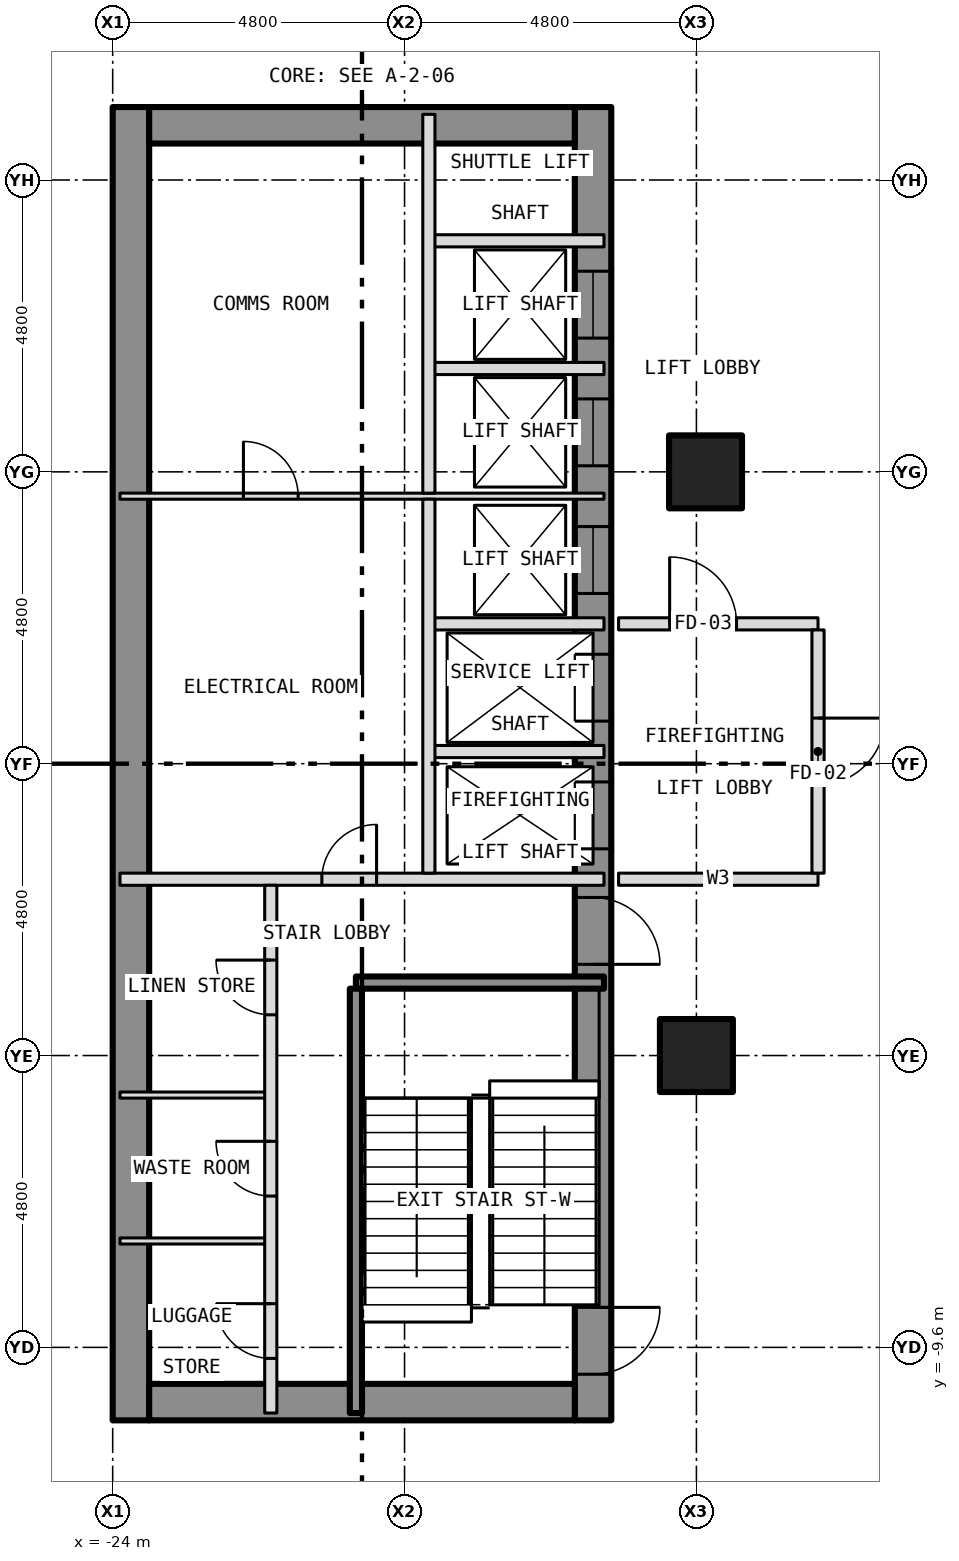
"""IFC4 building model, lengths in metres.
Left out: names, types, materials, properties, quantities, classifications, styles, units other than length and angle.
Written with IfcOpenShell. Run it as: python <this file> out.ifc"""

import sys

from ifc_helpers import new_model, si_unit, direction, frame, frame_2d, origin, origin_2d, place, context, subcontext, project, spatial, rectangle, hollow_rectangle, extrude, element, fill, save


model = new_model("IFC4")
c1 = context("Model", 3, precision=1e-05, world=origin(), true_north=direction((0.0, 1.0)))
c2 = subcontext(c1, "Body", "Model", "MODEL_VIEW")
j1 = project(units=[si_unit("LENGTHUNIT", "METRE"), si_unit("PLANEANGLEUNIT", "RADIAN")], contexts=[c1])
p1 = place(None, origin())
s1 = spatial("IfcSite", under=j1, at=p1, CompositionType="ELEMENT")
p2 = place(p1, origin())
s2 = spatial("IfcBuilding", under=s1, at=p2, CompositionType="ELEMENT")
p3 = place(p2, frame((0.0, 0.0, 20.0)))
s3 = spatial("IfcBuildingStorey", under=s2, at=p3, CompositionType="ELEMENT", Elevation=20.0)
for number, where, z_axis, x_axis in (
    (1, (-14.4, -4.8, -0.2), (0.0, 0.0, 1.0), (1.0, 0.0, 0.0)),
    (2, (-14.25, 4.8, -0.2), (0.0, 0.0, 1.0), (1.0, 0.0, 0.0)),
):
    element("IfcColumn", number, at=place(p3, frame(where, z_axis=z_axis, x_axis=x_axis)), inside=s3, PredefinedType="COLUMN", context=c2, shape_type="SweptSolid", body=[
        extrude(hollow_rectangle(XDim=1.2, YDim=1.2, WallThickness=0.07, at=origin_2d()), origin(), (0.0, 0.0, 1.0), 4.5),
    ])
p4 = place(p3, frame((-16.1, -10.8, 0.0), z_axis=(0.0, 0.0, 1.0), x_axis=(0.0, 1.0, 0.0)))
e3 = element("IfcWall", 3, at=p4, inside=s3, PredefinedType="SHEAR", context=c2, shape_type="SweptSolid", body=[
    extrude(rectangle(XDim=21.6, YDim=0.6, at=frame_2d((10.8, 0.0))), origin(), (0.0, 0.0, 1.0), 4.2),
])
p5 = place(p4, frame((9.4, 0.0, 0.0)))
e4 = element("IfcOpeningElement", 4, at=p5, cuts=e3, PredefinedType="OPENING", context=c2, shape_type="SweptSolid", body=[
    extrude(rectangle(XDim=1.1, YDim=2.1, at=frame_2d((0.55, 1.05))), frame((0.0, 0.312, 0.0), z_axis=(0.0, -1.0, 0.0), x_axis=(1.0, 0.0, 0.0)), (0.0, 0.0, 1.0), 0.624),
])
p6 = place(p4, frame((11.5, 0.0, 0.0)))
e5 = element("IfcOpeningElement", 5, at=p6, cuts=e3, PredefinedType="OPENING", context=c2, shape_type="SweptSolid", body=[
    extrude(rectangle(XDim=1.1, YDim=2.1, at=frame_2d((0.55, 1.05))), frame((0.0, 0.312, 0.0), z_axis=(0.0, -1.0, 0.0), x_axis=(1.0, 0.0, 0.0)), (0.0, 0.0, 1.0), 0.624),
])
p7 = place(p4, frame((13.6, 0.0, 0.0)))
e6 = element("IfcOpeningElement", 6, at=p7, cuts=e3, PredefinedType="OPENING", context=c2, shape_type="SweptSolid", body=[
    extrude(rectangle(XDim=1.1, YDim=2.1, at=frame_2d((0.55, 1.05))), frame((0.0, 0.312, 0.0), z_axis=(0.0, -1.0, 0.0), x_axis=(1.0, 0.0, 0.0)), (0.0, 0.0, 1.0), 0.624),
])
p8 = place(p4, frame((15.7, 0.0, 0.0)))
e7 = element("IfcOpeningElement", 7, at=p8, cuts=e3, PredefinedType="OPENING", context=c2, shape_type="SweptSolid", body=[
    extrude(rectangle(XDim=1.1, YDim=2.1, at=frame_2d((0.55, 1.05))), frame((0.0, 0.312, 0.0), z_axis=(0.0, -1.0, 0.0), x_axis=(1.0, 0.0, 0.0)), (0.0, 0.0, 1.0), 0.624),
])
p9 = place(p4, frame((17.8, 0.0, 0.0)))
e8 = element("IfcOpeningElement", 8, at=p9, cuts=e3, PredefinedType="OPENING", context=c2, shape_type="SweptSolid", body=[
    extrude(rectangle(XDim=1.1, YDim=2.1, at=frame_2d((0.55, 1.05))), frame((0.0, 0.312, 0.0), z_axis=(0.0, -1.0, 0.0), x_axis=(1.0, 0.0, 0.0)), (0.0, 0.0, 1.0), 0.624),
])
p10 = place(p4, frame((0.758, 0.0, 0.0)))
e9 = element("IfcOpeningElement", 9, at=p10, cuts=e3, PredefinedType="OPENING", context=c2, shape_type="SweptSolid", body=[
    extrude(rectangle(XDim=1.1, YDim=2.1, at=frame_2d((0.55, 1.05))), frame((0.0, 0.312, 0.0), z_axis=(0.0, -1.0, 0.0), x_axis=(1.0, 0.0, 0.0)), (0.0, 0.0, 1.0), 0.624),
])
p11 = place(p4, frame((7.5, 0.0, 0.0)))
e10 = element("IfcOpeningElement", 10, at=p11, cuts=e3, PredefinedType="OPENING", context=c2, shape_type="SweptSolid", body=[
    extrude(rectangle(XDim=1.1, YDim=2.1, at=frame_2d((0.55, 1.05))), frame((0.0, 0.312, 0.0), z_axis=(0.0, -1.0, 0.0), x_axis=(1.0, 0.0, 0.0)), (0.0, 0.0, 1.0), 0.624),
])
p12 = place(p3, frame((-23.7, -10.8, 0.0), z_axis=(0.0, 0.0, 1.0), x_axis=(0.0, 1.0, 0.0)))
e11 = element("IfcWall", 11, at=p12, inside=s3, PredefinedType="SHEAR", context=c2, shape_type="SweptSolid", body=[
    extrude(rectangle(XDim=21.6, YDim=0.6, at=frame_2d((10.8, 0.0))), origin(), (0.0, 0.0, 1.0), 4.2),
])
for number, where, z_axis, x_axis in (
    (12, (-23.4, 10.5, 0.0), (0.0, 0.0, 1.0), (1.0, 0.0, 0.0)),
    (13, (-23.4, -10.5, 0.0), (0.0, 0.0, 1.0), (1.0, 0.0, 0.0)),
):
    element("IfcWall", number, at=place(p3, frame(where, z_axis=z_axis, x_axis=x_axis)), inside=s3, PredefinedType="SHEAR", context=c2, shape_type="SweptSolid", body=[
        extrude(rectangle(XDim=7.0, YDim=0.6, at=frame_2d((3.5, 0.0))), origin(), (0.0, 0.0, 1.0), 4.2),
    ])
for number, where, z_axis, x_axis in (
    (14, (-23.88, -7.85, 0.0), (0.0, 0.0, 1.0), (1.0, 0.0, 0.0)),
    (15, (-23.88, -5.45, 0.0), (0.0, 0.0, 1.0), (1.0, 0.0, 0.0)),
):
    element("IfcWall", number, at=place(p3, frame(where, z_axis=z_axis, x_axis=x_axis)), inside=s3, PredefinedType="PARTITIONING", context=c2, shape_type="SweptSolid", body=[
        extrude(rectangle(XDim=2.48, YDim=0.1, at=frame_2d((1.24, 0.0))), origin(), (0.0, 0.0, 1.0), 4.2),
    ])
p13 = place(p3, frame((-20.0, -3.6, 0.0), z_axis=(0.0, 0.0, 1.0), x_axis=(1.0, 0.0, 0.0)))
e16 = element("IfcWall", 16, at=p13, inside=s3, PredefinedType="SHEAR", context=c2, shape_type="SweptSolid", body=[
    extrude(rectangle(XDim=4.08, YDim=0.2, at=frame_2d((2.04, 0.0))), origin(), (0.0, 0.0, 1.0), 4.2),
])
p14 = place(p3, frame((-23.88, -1.9, 0.0), z_axis=(0.0, 0.0, 1.0), x_axis=(1.0, 0.0, 0.0)))
e17 = element("IfcWall", 17, at=p14, inside=s3, PredefinedType="PARTITIONING", context=c2, shape_type="SweptSolid", body=[
    extrude(rectangle(XDim=7.96, YDim=0.2, at=frame_2d((3.98, 0.0))), origin(), (0.0, 0.0, 1.0), 4.2),
])
p15 = place(p14, frame((3.32, 0.0, 0.0)))
e18 = element("IfcOpeningElement", 18, at=p15, cuts=e17, PredefinedType="OPENING", context=c2, shape_type="SweptSolid", body=[
    extrude(rectangle(XDim=0.9, YDim=2.1, at=frame_2d((0.45, 1.05))), frame((0.0, 0.112, 0.0), z_axis=(0.0, -1.0, 0.0), x_axis=(1.0, 0.0, 0.0)), (0.0, 0.0, 1.0), 0.224),
])
p16 = place(p3, frame((-15.68, -1.9, 0.0), z_axis=(0.0, 0.0, 1.0), x_axis=(1.0, 0.0, 0.0)))
e19 = element("IfcWall", 19, at=p16, inside=s3, PredefinedType="PARTITIONING", context=c2, shape_type="SweptSolid", body=[
    extrude(rectangle(XDim=3.28, YDim=0.2, at=frame_2d((1.64, 0.0))), origin(), (0.0, 0.0, 1.0), 4.3),
])
for number, where, z_axis, x_axis in (
    (20, (-18.8, 0.2, 0.0), (0.0, 0.0, 1.0), (1.0, 0.0, 0.0)),
    (21, (-18.8, 2.3, 0.0), (0.0, 0.0, 1.0), (1.0, 0.0, 0.0)),
):
    element("IfcWall", number, at=place(p3, frame(where, z_axis=z_axis, x_axis=x_axis)), inside=s3, PredefinedType="PARTITIONING", context=c2, shape_type="SweptSolid", body=[
        extrude(rectangle(XDim=2.88, YDim=0.2, at=frame_2d((1.44, 0.0))), origin(), (0.0, 0.0, 1.0), 4.2),
    ])
p17 = place(p3, frame((-15.68, 2.3, 0.0), z_axis=(0.0, 0.0, 1.0), x_axis=(1.0, 0.0, 0.0)))
e22 = element("IfcWall", 22, at=p17, inside=s3, PredefinedType="PARTITIONING", context=c2, shape_type="SweptSolid", body=[
    extrude(rectangle(XDim=3.28, YDim=0.2, at=frame_2d((1.64, 0.0))), origin(), (0.0, 0.0, 1.0), 4.3),
])
p18 = place(p17, frame((0.84, 0.0, 0.0)))
e23 = element("IfcOpeningElement", 23, at=p18, cuts=e22, PredefinedType="OPENING", context=c2, shape_type="SweptSolid", body=[
    extrude(rectangle(XDim=1.1, YDim=2.1, at=frame_2d((0.55, 1.05))), frame((0.0, 0.112, 0.0), z_axis=(0.0, -1.0, 0.0), x_axis=(1.0, 0.0, 0.0)), (0.0, 0.0, 1.0), 0.224),
])
p19 = place(p3, frame((-23.88, 4.4, 0.0), z_axis=(0.0, 0.0, 1.0), x_axis=(1.0, 0.0, 0.0)))
e24 = element("IfcWall", 24, at=p19, inside=s3, PredefinedType="PARTITIONING", context=c2, shape_type="SweptSolid", body=[
    extrude(rectangle(XDim=7.96, YDim=0.1, at=frame_2d((3.98, 0.0))), origin(), (0.0, 0.0, 1.0), 4.2),
])
p20 = place(p19, frame((2.03, 0.0, 0.0)))
e25 = element("IfcOpeningElement", 25, at=p20, cuts=e24, PredefinedType="OPENING", context=c2, shape_type="SweptSolid", body=[
    extrude(rectangle(XDim=0.9, YDim=2.1, at=frame_2d((0.45, 1.05))), frame((0.0, 0.062, 0.0), z_axis=(0.0, -1.0, 0.0), x_axis=(1.0, 0.0, 0.0)), (0.0, 0.0, 1.0), 0.124),
])
for number, where, z_axis, x_axis in (
    (26, (-18.8, 6.5, 0.0), (0.0, 0.0, 1.0), (1.0, 0.0, 0.0)),
    (27, (-18.8, 8.6, 0.0), (0.0, 0.0, 1.0), (1.0, 0.0, 0.0)),
):
    element("IfcWall", number, at=place(p3, frame(where, z_axis=z_axis, x_axis=x_axis)), inside=s3, PredefinedType="PARTITIONING", context=c2, shape_type="SweptSolid", body=[
        extrude(rectangle(XDim=2.88, YDim=0.2, at=frame_2d((1.44, 0.0))), origin(), (0.0, 0.0, 1.0), 4.2),
    ])
p21 = place(p3, frame((-21.4, -10.68, 0.0), z_axis=(0.0, 0.0, 1.0), x_axis=(0.0, 1.0, 0.0)))
e28 = element("IfcWall", 28, at=p21, inside=s3, PredefinedType="PARTITIONING", context=c2, shape_type="SweptSolid", body=[
    extrude(rectangle(XDim=8.68, YDim=0.2, at=frame_2d((4.34, 0.0))), origin(), (0.0, 0.0, 1.0), 4.2),
])
p22 = place(p21, frame((0.899, 0.0, 0.0)))
e29 = element("IfcOpeningElement", 29, at=p22, cuts=e28, PredefinedType="OPENING", context=c2, shape_type="SweptSolid", body=[
    extrude(rectangle(XDim=0.9, YDim=2.1, at=frame_2d((0.45, 1.05))), frame((0.0, 0.112, 0.0), z_axis=(0.0, -1.0, 0.0), x_axis=(1.0, 0.0, 0.0)), (0.0, 0.0, 1.0), 0.224),
])
p23 = place(p21, frame((3.569, 0.0, 0.0)))
e30 = element("IfcOpeningElement", 30, at=p23, cuts=e28, PredefinedType="OPENING", context=c2, shape_type="SweptSolid", body=[
    extrude(rectangle(XDim=0.9, YDim=2.1, at=frame_2d((0.45, 1.05))), frame((0.0, 0.112, 0.0), z_axis=(0.0, -1.0, 0.0), x_axis=(1.0, 0.0, 0.0)), (0.0, 0.0, 1.0), 0.224),
])
p24 = place(p21, frame((6.55, 0.0, 0.0)))
e31 = element("IfcOpeningElement", 31, at=p24, cuts=e28, PredefinedType="OPENING", context=c2, shape_type="SweptSolid", body=[
    extrude(rectangle(XDim=0.9, YDim=2.1, at=frame_2d((0.45, 1.05))), frame((0.0, 0.112, 0.0), z_axis=(0.0, -1.0, 0.0), x_axis=(1.0, 0.0, 0.0)), (0.0, 0.0, 1.0), 0.224),
])
p25 = place(p3, frame((-20.0, -10.68, 0.0), z_axis=(0.0, 0.0, 1.0), x_axis=(0.0, 1.0, 0.0)))
e32 = element("IfcWall", 32, at=p25, inside=s3, PredefinedType="SHEAR", context=c2, shape_type="SweptSolid", body=[
    extrude(rectangle(XDim=6.98, YDim=0.2, at=frame_2d((3.49, 0.0))), origin(), (0.0, 0.0, 1.0), 4.2),
])
p26 = place(p3, frame((-18.8, -1.8, 0.0), z_axis=(0.0, 0.0, 1.0), x_axis=(0.0, 1.0, 0.0)))
e33 = element("IfcWall", 33, at=p26, inside=s3, PredefinedType="PARTITIONING", context=c2, shape_type="SweptSolid", body=[
    extrude(rectangle(XDim=6.15, YDim=0.2, at=frame_2d((3.075, 0.0))), origin(), (0.0, 0.0, 1.0), 4.2),
])
p27 = place(p3, frame((-18.8, 4.45, 0.0), z_axis=(0.0, 0.0, 1.0), x_axis=(0.0, 1.0, 0.0)))
e34 = element("IfcWall", 34, at=p27, inside=s3, PredefinedType="PARTITIONING", context=c2, shape_type="SweptSolid", body=[
    extrude(rectangle(XDim=6.23, YDim=0.2, at=frame_2d((3.115, 0.0))), origin(), (0.0, 0.0, 1.0), 4.2),
])
p28 = place(p3, frame((-12.4, -1.8, 0.0), z_axis=(0.0, 0.0, 1.0), x_axis=(0.0, 1.0, 0.0)))
e35 = element("IfcWall", 35, at=p28, inside=s3, PredefinedType="PARTITIONING", context=c2, shape_type="SweptSolid", body=[
    extrude(rectangle(XDim=4.0, YDim=0.2, at=frame_2d((2.0, 0.0))), origin(), (0.0, 0.0, 1.0), 4.3),
])
p29 = place(p28, frame((1.45, 0.0, 0.0)))
e36 = element("IfcOpeningElement", 36, at=p29, cuts=e35, PredefinedType="OPENING", context=c2, shape_type="SweptSolid", body=[
    extrude(rectangle(XDim=1.1, YDim=2.1, at=frame_2d((0.55, 1.05))), frame((0.0, 0.112, 0.0), z_axis=(0.0, -1.0, 0.0), x_axis=(1.0, 0.0, 0.0)), (0.0, 0.0, 1.0), 0.224),
])
p30 = place(p5, origin())
e37 = element("IfcDoor", 37, at=p30, inside=s3, OperationType="SLIDING_TO_LEFT", PredefinedType="DOOR", context=c2, shape_type="SweptSolid", body=[
    extrude(rectangle(XDim=1.1, YDim=2.1, at=frame_2d((0.55, 1.05))), frame((0.0, 0.025, 0.0), z_axis=(0.0, -1.0, 0.0), x_axis=(1.0, 0.0, 0.0)), (0.0, 0.0, 1.0), 0.05),
])
fill(e4, e37)
p31 = place(p6, origin())
e38 = element("IfcDoor", 38, at=p31, inside=s3, OperationType="SLIDING_TO_LEFT", PredefinedType="DOOR", context=c2, shape_type="SweptSolid", body=[
    extrude(rectangle(XDim=1.1, YDim=2.1, at=frame_2d((0.55, 1.05))), frame((0.0, 0.025, 0.0), z_axis=(0.0, -1.0, 0.0), x_axis=(1.0, 0.0, 0.0)), (0.0, 0.0, 1.0), 0.05),
])
fill(e5, e38)
p32 = place(p7, origin())
e39 = element("IfcDoor", 39, at=p32, inside=s3, OperationType="SLIDING_TO_LEFT", PredefinedType="DOOR", context=c2, shape_type="SweptSolid", body=[
    extrude(rectangle(XDim=1.1, YDim=2.1, at=frame_2d((0.55, 1.05))), frame((0.0, 0.025, 0.0), z_axis=(0.0, -1.0, 0.0), x_axis=(1.0, 0.0, 0.0)), (0.0, 0.0, 1.0), 0.05),
])
fill(e6, e39)
p33 = place(p8, origin())
e40 = element("IfcDoor", 40, at=p33, inside=s3, OperationType="SLIDING_TO_LEFT", PredefinedType="DOOR", context=c2, shape_type="SweptSolid", body=[
    extrude(rectangle(XDim=1.1, YDim=2.1, at=frame_2d((0.55, 1.05))), frame((0.0, 0.025, 0.0), z_axis=(0.0, -1.0, 0.0), x_axis=(1.0, 0.0, 0.0)), (0.0, 0.0, 1.0), 0.05),
])
fill(e7, e40)
p34 = place(p9, origin())
e41 = element("IfcDoor", 41, at=p34, inside=s3, OperationType="SLIDING_TO_LEFT", PredefinedType="DOOR", context=c2, shape_type="SweptSolid", body=[
    extrude(rectangle(XDim=1.1, YDim=2.1, at=frame_2d((0.55, 1.05))), frame((0.0, 0.025, 0.0), z_axis=(0.0, -1.0, 0.0), x_axis=(1.0, 0.0, 0.0)), (0.0, 0.0, 1.0), 0.05),
])
fill(e8, e41)
p35 = place(p10, origin())
e42 = element("IfcDoor", 42, at=p35, inside=s3, OperationType="SINGLE_SWING_RIGHT", PredefinedType="DOOR", context=c2, shape_type="SweptSolid", body=[
    extrude(rectangle(XDim=1.1, YDim=2.1, at=frame_2d((0.55, 1.05))), frame((0.0, 0.025, 0.0), z_axis=(0.0, -1.0, 0.0), x_axis=(1.0, 0.0, 0.0)), (0.0, 0.0, 1.0), 0.05),
])
fill(e9, e42)
p36 = place(p11, origin())
e43 = element("IfcDoor", 43, at=p36, inside=s3, OperationType="SINGLE_SWING_LEFT", PredefinedType="DOOR", context=c2, shape_type="SweptSolid", body=[
    extrude(rectangle(XDim=1.1, YDim=2.1, at=frame_2d((0.55, 1.05))), frame((0.0, 0.025, 0.0), z_axis=(0.0, -1.0, 0.0), x_axis=(1.0, 0.0, 0.0)), (0.0, 0.0, 1.0), 0.05),
])
fill(e10, e43)
p37 = place(p22, origin())
e44 = element("IfcDoor", 44, at=p37, inside=s3, OperationType="SINGLE_SWING_RIGHT", PredefinedType="DOOR", context=c2, shape_type="SweptSolid", body=[
    extrude(rectangle(XDim=0.9, YDim=2.1, at=frame_2d((0.45, 1.05))), frame((0.0, 0.025, 0.0), z_axis=(0.0, -1.0, 0.0), x_axis=(1.0, 0.0, 0.0)), (0.0, 0.0, 1.0), 0.05),
])
fill(e29, e44)
p38 = place(p23, origin())
e45 = element("IfcDoor", 45, at=p38, inside=s3, OperationType="SINGLE_SWING_RIGHT", PredefinedType="DOOR", context=c2, shape_type="SweptSolid", body=[
    extrude(rectangle(XDim=0.9, YDim=2.1, at=frame_2d((0.45, 1.05))), frame((0.0, 0.025, 0.0), z_axis=(0.0, -1.0, 0.0), x_axis=(1.0, 0.0, 0.0)), (0.0, 0.0, 1.0), 0.05),
])
fill(e30, e45)
p39 = place(p24, origin())
e46 = element("IfcDoor", 46, at=p39, inside=s3, OperationType="SINGLE_SWING_RIGHT", PredefinedType="DOOR", context=c2, shape_type="SweptSolid", body=[
    extrude(rectangle(XDim=0.9, YDim=2.1, at=frame_2d((0.45, 1.05))), frame((0.0, 0.025, 0.0), z_axis=(0.0, -1.0, 0.0), x_axis=(1.0, 0.0, 0.0)), (0.0, 0.0, 1.0), 0.05),
])
fill(e31, e46)
p40 = place(p15, origin())
e47 = element("IfcDoor", 47, at=p40, inside=s3, OperationType="SINGLE_SWING_RIGHT", PredefinedType="DOOR", context=c2, shape_type="SweptSolid", body=[
    extrude(rectangle(XDim=0.9, YDim=2.1, at=frame_2d((0.45, 1.05))), frame((0.0, 0.025, 0.0), z_axis=(0.0, -1.0, 0.0), x_axis=(1.0, 0.0, 0.0)), (0.0, 0.0, 1.0), 0.05),
])
fill(e18, e47)
p41 = place(p20, origin())
e48 = element("IfcDoor", 48, at=p41, inside=s3, OperationType="SINGLE_SWING_LEFT", PredefinedType="DOOR", context=c2, shape_type="SweptSolid", body=[
    extrude(rectangle(XDim=0.9, YDim=2.1, at=frame_2d((0.45, 1.05))), frame((0.0, 0.025, 0.0), z_axis=(0.0, -1.0, 0.0), x_axis=(1.0, 0.0, 0.0)), (0.0, 0.0, 1.0), 0.05),
])
fill(e25, e48)
p42 = place(p29, origin())
e49 = element("IfcDoor", 49, at=p42, inside=s3, OperationType="SINGLE_SWING_RIGHT", PredefinedType="DOOR", context=c2, shape_type="SweptSolid", body=[
    extrude(rectangle(XDim=1.1, YDim=2.1, at=frame_2d((0.55, 1.05))), frame((0.0, 0.025, 0.0), z_axis=(0.0, -1.0, 0.0), x_axis=(1.0, 0.0, 0.0)), (0.0, 0.0, 1.0), 0.05),
])
fill(e36, e49)
p43 = place(p18, origin())
e50 = element("IfcDoor", 50, at=p43, inside=s3, OperationType="SINGLE_SWING_LEFT", PredefinedType="DOOR", context=c2, shape_type="SweptSolid", body=[
    extrude(rectangle(XDim=1.1, YDim=2.1, at=frame_2d((0.55, 1.05))), frame((0.0, 0.025, 0.0), z_axis=(0.0, -1.0, 0.0), x_axis=(1.0, 0.0, 0.0)), (0.0, 0.0, 1.0), 0.05),
])
fill(e23, e50)
save(model, sys.argv[1])
